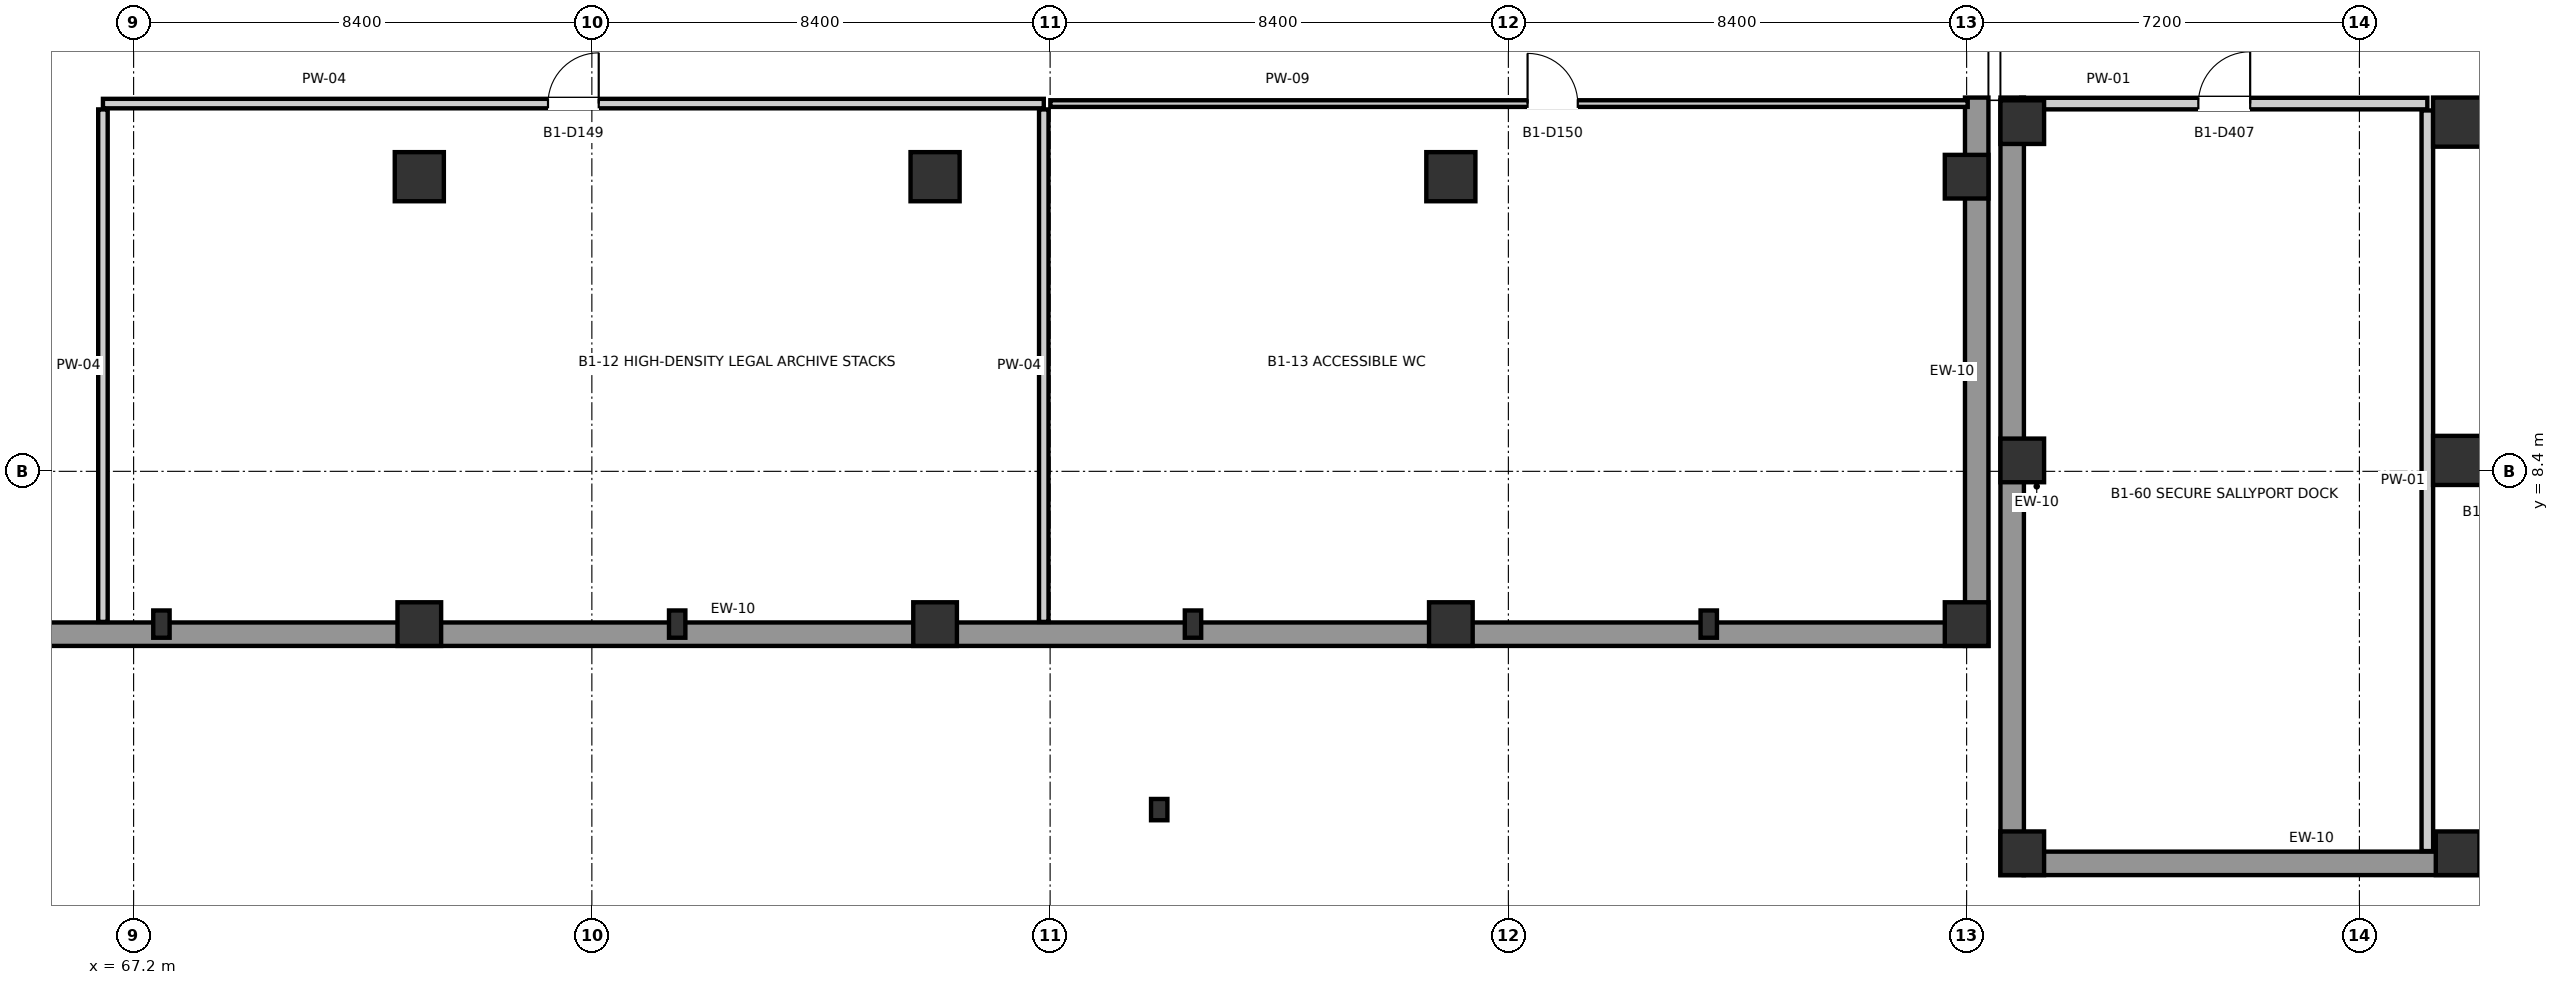
"""IFC4 building model, lengths in metres.
Left out: names, types, materials, properties, quantities, classifications, styles, units other than length and angle.
Written with IfcOpenShell. Run it as: python <this file> out.ifc"""

import sys

from ifc_helpers import new_model, si_unit, direction, frame, frame_2d, origin, origin_2d, place, context, subcontext, project, spatial, rectangle, i_section, extrude, element, fill, save


model = new_model("IFC4")
c1 = context("Model", 3, precision=1e-05, world=origin(), true_north=direction((0.0, 1.0)))
c2 = subcontext(c1, "Body", "Model", "MODEL_VIEW")
j1 = project(units=[si_unit("LENGTHUNIT", "METRE"), si_unit("PLANEANGLEUNIT", "RADIAN")], contexts=[c1])
p1 = place(None, origin())
s1 = spatial("IfcSite", under=j1, at=p1, CompositionType="ELEMENT")
p2 = place(p1, origin())
s2 = spatial("IfcBuilding", under=s1, at=p2, CompositionType="ELEMENT")
p3 = place(p2, frame((0.0, 0.0, -4.2)))
s3 = spatial("IfcBuildingStorey", under=s2, at=p3, CompositionType="ELEMENT", Elevation=-4.2)
p4 = place(p3, frame((86.0, 2.2, 0.0), z_axis=(0.0, 0.0, 1.0), x_axis=(1.0, 0.0, 0.0)))
e1 = element("IfcColumn", 1, at=p4, inside=s3, PredefinedType="COLUMN", context=c2, shape_type="SweptSolid", body=[
    extrude(i_section(OverallWidth=0.3, OverallDepth=0.39, WebThickness=0.011, FlangeThickness=0.019, FilletRadius=0.027, at=origin_2d()), origin(), (0.0, 0.0, 1.0), 3.995),
])
p5 = place(p3, frame((72.437, 5.6, 0.0), z_axis=(0.0, 0.0, 1.0), x_axis=(1.0, 0.0, 0.0)))
e2 = element("IfcColumn", 2, at=p5, inside=s3, PredefinedType="COLUMN", context=c2, shape_type="SweptSolid", body=[
    extrude(rectangle(XDim=0.8, YDim=0.8, at=origin_2d()), origin(), (0.0, 0.0, 1.0), 4.2),
])
p6 = place(p3, frame((72.437, 13.8, 0.0), z_axis=(0.0, 0.0, 1.0), x_axis=(1.0, 0.0, 0.0)))
e3 = element("IfcColumn", 3, at=p6, inside=s3, PredefinedType="COLUMN", context=c2, shape_type="SweptSolid", body=[
    extrude(rectangle(XDim=0.9, YDim=0.9, at=origin_2d()), origin(), (0.0, 0.0, 1.0), 4.2),
])
p7 = place(p3, frame((81.891, 5.6, 0.0), z_axis=(0.0, 0.0, 1.0), x_axis=(1.0, 0.0, 0.0)))
e4 = element("IfcColumn", 4, at=p7, inside=s3, PredefinedType="COLUMN", context=c2, shape_type="SweptSolid", body=[
    extrude(rectangle(XDim=0.8, YDim=0.8, at=origin_2d()), origin(), (0.0, 0.0, 1.0), 4.2),
])
p8 = place(p3, frame((81.891, 13.8, 0.0), z_axis=(0.0, 0.0, 1.0), x_axis=(1.0, 0.0, 0.0)))
e5 = element("IfcColumn", 5, at=p8, inside=s3, PredefinedType="COLUMN", context=c2, shape_type="SweptSolid", body=[
    extrude(rectangle(XDim=0.9, YDim=0.9, at=origin_2d()), origin(), (0.0, 0.0, 1.0), 4.2),
])
p9 = place(p3, frame((91.346, 5.6, 0.0), z_axis=(0.0, 0.0, 1.0), x_axis=(1.0, 0.0, 0.0)))
e6 = element("IfcColumn", 6, at=p9, inside=s3, PredefinedType="COLUMN", context=c2, shape_type="SweptSolid", body=[
    extrude(rectangle(XDim=0.8, YDim=0.8, at=origin_2d()), origin(), (0.0, 0.0, 1.0), 4.2),
])
p10 = place(p3, frame((91.346, 13.8, 0.0), z_axis=(0.0, 0.0, 1.0), x_axis=(1.0, 0.0, 0.0)))
e7 = element("IfcColumn", 7, at=p10, inside=s3, PredefinedType="COLUMN", context=c2, shape_type="SweptSolid", body=[
    extrude(rectangle(XDim=0.9, YDim=0.9, at=origin_2d()), origin(), (0.0, 0.0, 1.0), 4.2),
])
for number, where, z_axis, x_axis in (
    (8, (100.8, 5.6, 0.0), (0.0, 0.0, 1.0), (1.0, 0.0, 0.0)),
    (9, (100.8, 13.8, 0.0), (0.0, 0.0, 1.0), (1.0, 0.0, 0.0)),
    (10, (101.82, 1.4, 0.0), (0.0, 0.0, 1.0), (1.0, 0.0, 0.0)),
    (11, (101.82, 8.6, 0.0), (0.0, 0.0, 1.0), (1.0, 0.0, 0.0)),
    (12, (101.82, 14.8, 0.0), (0.0, 0.0, 1.0), (1.0, 0.0, 0.0)),
    (13, (109.8, 1.4, 0.0), (0.0, 0.0, 1.0), (1.0, 0.0, 0.0)),
):
    element("IfcColumn", number, at=place(p3, frame(where, z_axis=z_axis, x_axis=x_axis)), inside=s3, PredefinedType="COLUMN", context=c2, shape_type="SweptSolid", body=[
        extrude(rectangle(XDim=0.8, YDim=0.8, at=origin_2d()), origin(), (0.0, 0.0, 1.0), 4.2),
    ])
for number, where, z_axis, x_axis in (
    (14, (109.8, 8.6, 0.0), (0.0, 0.0, 1.0), (1.0, 0.0, 0.0)),
    (15, (109.8, 14.8, 0.0), (0.0, 0.0, 1.0), (1.0, 0.0, 0.0)),
):
    element("IfcColumn", number, at=place(p3, frame(where, z_axis=z_axis, x_axis=x_axis)), inside=s3, PredefinedType="COLUMN", context=c2, shape_type="SweptSolid", body=[
        extrude(rectangle(XDim=0.9, YDim=0.9, at=origin_2d()), origin(), (0.0, 0.0, 1.0), 4.2),
    ])
for number, where, z_axis, x_axis in (
    (16, (67.71, 5.6, 0.0), (0.0, 0.0, 1.0), (1.0, 0.0, 0.0)),
    (17, (77.164, 5.6, 0.0), (0.0, 0.0, 1.0), (1.0, 0.0, 0.0)),
    (18, (86.619, 5.6, 0.0), (0.0, 0.0, 1.0), (1.0, 0.0, 0.0)),
    (19, (96.073, 5.6, 0.0), (0.0, 0.0, 1.0), (1.0, 0.0, 0.0)),
):
    element("IfcColumn", number, at=place(p3, frame(where, z_axis=z_axis, x_axis=x_axis)), inside=s3, PredefinedType="COLUMN", context=c2, shape_type="SweptSolid", body=[
        extrude(i_section(OverallWidth=0.3, OverallDepth=0.5, WebThickness=0.014, FlangeThickness=0.028, FilletRadius=0.027, at=origin_2d()), origin(), (0.0, 0.0, 1.0), 4.2),
    ])
p11 = place(p3, frame((34.645, 5.415, 0.0), z_axis=(0.0, 0.0, 1.0), x_axis=(1.0, 0.0, 0.0)))
e20 = element("IfcWall", 20, at=p11, inside=s3, PredefinedType="SOLIDWALL", context=c2, shape_type="SweptSolid", body=[
    extrude(rectangle(XDim=66.13, YDim=0.43, at=frame_2d((33.065, 0.0))), origin(), (0.0, 0.0, 1.0), 4.2),
])
p12 = place(p3, frame((100.985, 5.2, 0.0), z_axis=(0.0, 0.0, 1.0), x_axis=(0.0, 1.0, 0.0)))
e21 = element("IfcWall", 21, at=p12, inside=s3, PredefinedType="SOLIDWALL", context=c2, shape_type="SweptSolid", body=[
    extrude(rectangle(XDim=10.05, YDim=0.43, at=frame_2d((5.025, 0.0))), origin(), (0.0, 0.0, 1.0), 4.2),
])
p13 = place(p3, frame((101.845, 1.215, 0.0), z_axis=(0.0, 0.0, 1.0), x_axis=(1.0, 0.0, 0.0)))
e22 = element("IfcWall", 22, at=p13, inside=s3, PredefinedType="SOLIDWALL", context=c2, shape_type="SweptSolid", body=[
    extrude(rectangle(XDim=63.73, YDim=0.43, at=frame_2d((31.865, 0.0))), origin(), (0.0, 0.0, 1.0), 4.2),
])
p14 = place(p3, frame((101.635, 15.25, 0.0), z_axis=(0.0, 0.0, 1.0), x_axis=(0.0, -1.0, 0.0)))
e23 = element("IfcWall", 23, at=p14, inside=s3, PredefinedType="SOLIDWALL", context=c2, shape_type="SweptSolid", body=[
    extrude(rectangle(XDim=14.25, YDim=0.43, at=frame_2d((7.125, 0.0))), origin(), (0.0, 0.0, 1.0), 4.2),
])
p15 = place(p3, frame((66.638, 15.14, 0.0), z_axis=(0.0, 0.0, 1.0), x_axis=(1.0, 0.0, 0.0)))
e24 = element("IfcWall", 24, at=p15, inside=s3, PredefinedType="PARTITIONING", context=c2, shape_type="SweptSolid", body=[
    extrude(rectangle(XDim=17.246, YDim=0.174, at=frame_2d((8.623, 0.0))), origin(), (0.0, 0.0, 1.0), 3.86),
])
p16 = place(p15, frame((8.158, 0.0, 0.0)))
e25 = element("IfcOpeningElement", 25, at=p16, cuts=e24, PredefinedType="OPENING", context=c2, shape_type="SweptSolid", body=[
    extrude(rectangle(XDim=0.93, YDim=2.08, at=frame_2d((0.465, 1.04))), frame((0.0, 0.102, 0.0), z_axis=(0.0, -1.0, 0.0), x_axis=(1.0, 0.0, 0.0)), (0.0, 0.0, 1.0), 0.204),
])
for number, where, z_axis, x_axis in (
    (26, (66.638, 5.64, 0.0), (0.0, 0.0, 1.0), (0.0, 1.0, 0.0)),
    (27, (83.884, 5.64, 0.0), (0.0, 0.0, 1.0), (0.0, 1.0, 0.0)),
):
    element("IfcWall", number, at=place(p3, frame(where, z_axis=z_axis, x_axis=x_axis)), inside=s3, PredefinedType="PARTITIONING", context=c2, shape_type="SweptSolid", body=[
        extrude(rectangle(XDim=9.393, YDim=0.174, at=frame_2d((4.697, 0.0))), origin(), (0.0, 0.0, 1.0), 3.86),
    ])
p17 = place(p3, frame((84.004, 15.14, 0.0), z_axis=(0.0, 0.0, 1.0), x_axis=(1.0, 0.0, 0.0)))
e28 = element("IfcWall", 28, at=p17, inside=s3, PredefinedType="PARTITIONING", context=c2, shape_type="SweptSolid", body=[
    extrude(rectangle(XDim=16.816, YDim=0.122, at=frame_2d((8.408, 0.0))), origin(), (0.0, 0.0, 1.0), 3.86),
])
p18 = place(p17, frame((8.748, 0.0, 0.0)))
e29 = element("IfcOpeningElement", 29, at=p18, cuts=e28, PredefinedType="OPENING", context=c2, shape_type="SweptSolid", body=[
    extrude(rectangle(XDim=0.92, YDim=2.06, at=frame_2d((0.46, 1.03))), frame((0.0, 0.076, 0.0), z_axis=(0.0, -1.0, 0.0), x_axis=(1.0, 0.0, 0.0)), (0.0, 0.0, 1.0), 0.152),
])
p19 = place(p3, frame((101.8, 15.14, 0.0), z_axis=(0.0, 0.0, 1.0), x_axis=(1.0, 0.0, 0.0)))
e30 = element("IfcWall", 30, at=p19, inside=s3, PredefinedType="PARTITIONING", context=c2, shape_type="SweptSolid", body=[
    extrude(rectangle(XDim=7.445, YDim=0.212, at=frame_2d((3.723, 0.0))), origin(), (0.0, 0.0, 1.0), 3.35),
])
p20 = place(p19, frame((3.248, 0.0, 0.0)))
e31 = element("IfcOpeningElement", 31, at=p20, cuts=e30, PredefinedType="OPENING", context=c2, shape_type="SweptSolid", body=[
    extrude(rectangle(XDim=0.95, YDim=2.12, at=frame_2d((0.475, 1.06))), frame((0.0, 0.121, 0.0), z_axis=(0.0, -1.0, 0.0), x_axis=(1.0, 0.0, 0.0)), (0.0, 0.0, 1.0), 0.242),
])
p21 = place(p3, frame((109.245, 1.44, 0.0), z_axis=(0.0, 0.0, 1.0), x_axis=(0.0, 1.0, 0.0)))
e32 = element("IfcWall", 32, at=p21, inside=s3, PredefinedType="PARTITIONING", context=c2, shape_type="SweptSolid", body=[
    extrude(rectangle(XDim=13.574, YDim=0.212, at=frame_2d((6.787, 0.0))), origin(), (0.0, 0.0, 1.0), 3.86),
])
p22 = place(p3, frame((109.365, 15.14, 0.0), z_axis=(0.0, 0.0, 1.0), x_axis=(1.0, 0.0, 0.0)))
e33 = element("IfcWall", 33, at=p22, inside=s3, PredefinedType="PARTITIONING", context=c2, shape_type="SweptSolid", body=[
    extrude(rectangle(XDim=7.995, YDim=0.198, at=frame_2d((3.998, 0.0))), origin(), (0.0, 0.0, 1.0), 3.24),
])
p23 = place(p22, frame((3.522, 0.0, 0.0)))
e34 = element("IfcOpeningElement", 34, at=p23, cuts=e33, PredefinedType="OPENING", context=c2, shape_type="SweptSolid", body=[
    extrude(rectangle(XDim=0.95, YDim=2.12, at=frame_2d((0.475, 1.06))), frame((0.0, 0.114, 0.0), z_axis=(0.0, -1.0, 0.0), x_axis=(1.0, 0.0, 0.0)), (0.0, 0.0, 1.0), 0.228),
])
p24 = place(p16, frame((0.93, 0.0, 0.0), z_axis=(0.0, 0.0, 1.0), x_axis=(-1.0, 0.0, 0.0)))
e35 = element("IfcDoor", 35, at=p24, inside=s3, OperationType="SINGLE_SWING_RIGHT", PredefinedType="DOOR", context=c2, shape_type="SweptSolid", body=[
    extrude(rectangle(XDim=0.93, YDim=2.08, at=frame_2d((0.465, 1.04))), frame((0.0, 0.025, 0.0), z_axis=(0.0, -1.0, 0.0), x_axis=(1.0, 0.0, 0.0)), (0.0, 0.0, 1.0), 0.05),
])
fill(e25, e35)
p25 = place(p18, frame((0.92, 0.0, 0.0), z_axis=(0.0, 0.0, 1.0), x_axis=(-1.0, 0.0, 0.0)))
e36 = element("IfcDoor", 36, at=p25, inside=s3, OperationType="SINGLE_SWING_LEFT", PredefinedType="DOOR", context=c2, shape_type="SweptSolid", body=[
    extrude(rectangle(XDim=0.92, YDim=2.06, at=frame_2d((0.46, 1.03))), frame((0.0, 0.025, 0.0), z_axis=(0.0, -1.0, 0.0), x_axis=(1.0, 0.0, 0.0)), (0.0, 0.0, 1.0), 0.05),
])
fill(e29, e36)
p26 = place(p20, frame((0.95, 0.0, 0.0), z_axis=(0.0, 0.0, 1.0), x_axis=(-1.0, 0.0, 0.0)))
e37 = element("IfcDoor", 37, at=p26, inside=s3, OperationType="SINGLE_SWING_RIGHT", PredefinedType="DOOR", context=c2, shape_type="SweptSolid", body=[
    extrude(rectangle(XDim=0.95, YDim=2.12, at=frame_2d((0.475, 1.06))), frame((0.0, 0.025, 0.0), z_axis=(0.0, -1.0, 0.0), x_axis=(1.0, 0.0, 0.0)), (0.0, 0.0, 1.0), 0.05),
])
fill(e31, e37)
save(model, sys.argv[1])
